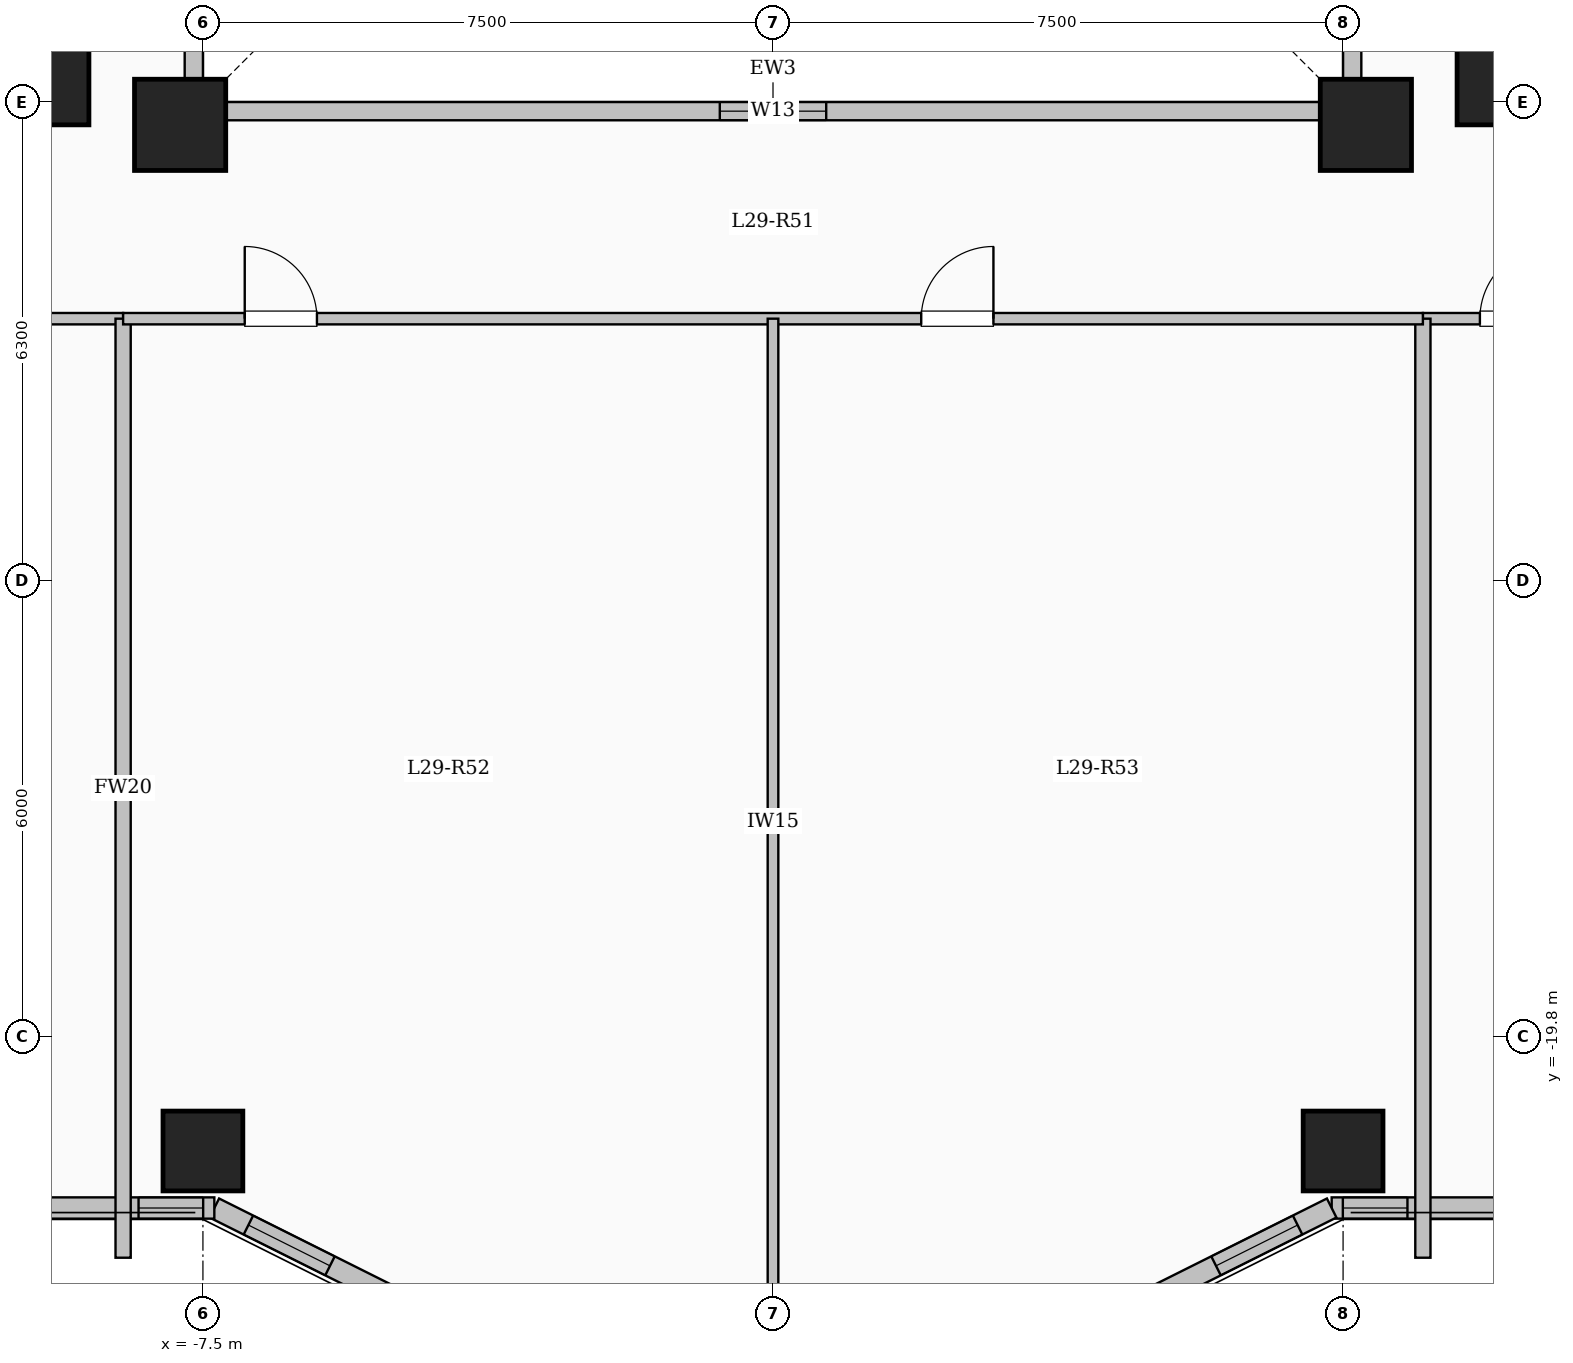
"""IFC4 building model, lengths in metres.
Left out: names, types, materials, properties, quantities, classifications, styles, units other than length and angle.
Written with IfcOpenShell. Run it as: python <this file> out.ifc"""

import sys

from ifc_helpers import new_model, si_unit, direction, frame, frame_2d, origin, origin_2d, place, context, subcontext, project, spatial, rectangle, extrude, element, fill, save


model = new_model("IFC4")
c1 = context("Model", 3, precision=1e-05, world=origin(), true_north=direction((0.0, 1.0)))
c2 = subcontext(c1, "Body", "Model", "MODEL_VIEW")
j1 = project(units=[si_unit("LENGTHUNIT", "METRE"), si_unit("PLANEANGLEUNIT", "RADIAN")], contexts=[c1])
p1 = place(None, origin())
s1 = spatial("IfcSite", under=j1, at=p1, CompositionType="ELEMENT")
p2 = place(p1, origin())
s2 = spatial("IfcBuilding", under=s1, at=p2, CompositionType="ELEMENT")
p3 = place(p2, frame((0.0, 0.0, 108.45)))
s3 = spatial("IfcBuildingStorey", under=s2, at=p3, CompositionType="ELEMENT", Elevation=108.45)
for number, where, z_axis, x_axis in (
    (1, (-7.8, -7.8, 0.0), (0.0, 0.0, 1.0), (1.0, 0.0, 0.0)),
    (2, (7.8, -7.8, 0.0), (0.0, 0.0, 1.0), (1.0, 0.0, 0.0)),
    (3, (-9.6, -7.2, 0.0), (0.0, 0.0, 1.0), (1.0, 0.0, 0.0)),
    (4, (9.6, -7.2, 0.0), (0.0, 0.0, 1.0), (1.0, 0.0, 0.0)),
):
    element("IfcColumn", number, at=place(p3, frame(where, z_axis=z_axis, x_axis=x_axis)), inside=s3, PredefinedType="COLUMN", context=c2, shape_type="SweptSolid", body=[
        extrude(rectangle(XDim=1.2, YDim=1.2, at=origin_2d()), origin(), (0.0, 0.0, 1.0), 3.35),
    ])
for number, where, z_axis, x_axis in (
    (5, (-7.5, -21.3, 0.0), (0.0, 0.0, 1.0), (1.0, 0.0, 0.0)),
    (6, (7.5, -21.3, 0.0), (0.0, 0.0, 1.0), (1.0, 0.0, 0.0)),
):
    element("IfcColumn", number, at=place(p3, frame(where, z_axis=z_axis, x_axis=x_axis)), inside=s3, PredefinedType="COLUMN", context=c2, shape_type="SweptSolid", body=[
        extrude(rectangle(XDim=1.05, YDim=1.05, at=origin_2d()), origin(), (0.0, 0.0, 1.0), 3.35),
    ])
p4 = place(p3, frame((-7.62, -7.62, 0.0), z_axis=(0.0, 0.0, 1.0), x_axis=(1.0, 0.0, 0.0)))
e7 = element("IfcWall", 7, at=p4, inside=s3, PredefinedType="SOLIDWALL", context=c2, shape_type="SweptSolid", body=[
    extrude(rectangle(XDim=15.24, YDim=0.24, at=frame_2d((7.62, 0.0))), origin(), (0.0, 0.0, 1.0), 3.1),
])
p5 = place(p4, frame((6.92, 0.0, 0.95)))
e8 = element("IfcOpeningElement", 8, at=p5, cuts=e7, PredefinedType="OPENING", context=c2, shape_type="SweptSolid", body=[
    extrude(rectangle(XDim=1.4, YDim=1.5, at=frame_2d((0.7, 0.75))), frame((0.0, 0.13, 0.0), z_axis=(0.0, -1.0, 0.0), x_axis=(1.0, 0.0, 0.0)), (0.0, 0.0, 1.0), 0.26),
])
p6 = place(p3, frame((7.62, -7.62, 0.0), z_axis=(0.0, 0.0, 1.0), x_axis=(0.0, 1.0, 0.0)))
e9 = element("IfcWall", 9, at=p6, inside=s3, PredefinedType="SOLIDWALL", context=c2, shape_type="SweptSolid", body=[
    extrude(rectangle(XDim=15.24, YDim=0.24, at=frame_2d((7.62, 0.0))), origin(), (0.0, 0.0, 1.0), 3.1),
])
p7 = place(p6, frame((6.92, 0.0, 0.95)))
e10 = element("IfcOpeningElement", 10, at=p7, cuts=e9, PredefinedType="OPENING", context=c2, shape_type="SweptSolid", body=[
    extrude(rectangle(XDim=1.4, YDim=1.5, at=frame_2d((0.7, 0.75))), frame((0.0, 0.13, 0.0), z_axis=(0.0, -1.0, 0.0), x_axis=(1.0, 0.0, 0.0)), (0.0, 0.0, 1.0), 0.26),
])
p8 = place(p3, frame((-7.62, 7.62, 0.0), z_axis=(0.0, 0.0, 1.0), x_axis=(0.0, -1.0, 0.0)))
e11 = element("IfcWall", 11, at=p8, inside=s3, PredefinedType="SOLIDWALL", context=c2, shape_type="SweptSolid", body=[
    extrude(rectangle(XDim=15.24, YDim=0.24, at=frame_2d((7.62, 0.0))), origin(), (0.0, 0.0, 1.0), 3.1),
])
p9 = place(p8, frame((6.92, 0.0, 0.95)))
e12 = element("IfcOpeningElement", 12, at=p9, cuts=e11, PredefinedType="OPENING", context=c2, shape_type="SweptSolid", body=[
    extrude(rectangle(XDim=1.4, YDim=1.5, at=frame_2d((0.7, 0.75))), frame((0.0, 0.13, 0.0), z_axis=(0.0, -1.0, 0.0), x_axis=(1.0, 0.0, 0.0)), (0.0, 0.0, 1.0), 0.26),
])
p10 = place(p3, frame((21.15, -22.05, 0.0), z_axis=(0.0, 0.0, 1.0), x_axis=(-1.0, 0.0, 0.0)))
e13 = element("IfcWall", 13, at=p10, inside=s3, PredefinedType="SOLIDWALL", context=c2, shape_type="SweptSolid", body=[
    extrude(rectangle(XDim=13.8, YDim=0.28, at=frame_2d((6.9, 0.0))), origin(), (0.0, 0.0, 1.0), 3.1),
])
p11 = place(p10, frame((0.88, 0.0, 0.95)))
e14 = element("IfcOpeningElement", 14, at=p11, cuts=e13, PredefinedType="OPENING", context=c2, shape_type="SweptSolid", body=[
    extrude(rectangle(XDim=1.2, YDim=1.5, at=frame_2d((0.6, 0.75))), frame((0.0, 0.15, 0.0), z_axis=(0.0, -1.0, 0.0), x_axis=(1.0, 0.0, 0.0)), (0.0, 0.0, 1.0), 0.3),
])
p12 = place(p10, frame((3.64, 0.0, 0.95)))
e15 = element("IfcOpeningElement", 15, at=p12, cuts=e13, PredefinedType="OPENING", context=c2, shape_type="SweptSolid", body=[
    extrude(rectangle(XDim=1.2, YDim=1.5, at=frame_2d((0.6, 0.75))), frame((0.0, 0.15, 0.0), z_axis=(0.0, -1.0, 0.0), x_axis=(1.0, 0.0, 0.0)), (0.0, 0.0, 1.0), 0.3),
])
p13 = place(p10, frame((6.35, 0.0, 0.95)))
e16 = element("IfcOpeningElement", 16, at=p13, cuts=e13, PredefinedType="OPENING", context=c2, shape_type="SweptSolid", body=[
    extrude(rectangle(XDim=1.2, YDim=1.5, at=frame_2d((0.6, 0.75))), frame((0.0, 0.15, 0.0), z_axis=(0.0, -1.0, 0.0), x_axis=(1.0, 0.0, 0.0)), (0.0, 0.0, 1.0), 0.3),
])
p14 = place(p10, frame((9.238, 0.0, 0.9)))
e17 = element("IfcOpeningElement", 17, at=p14, cuts=e13, PredefinedType="OPENING", context=c2, shape_type="SweptSolid", body=[
    extrude(rectangle(XDim=2.4, YDim=1.8, at=frame_2d((1.2, 0.9))), frame((0.0, 0.15, 0.0), z_axis=(0.0, -1.0, 0.0), x_axis=(1.0, 0.0, 0.0)), (0.0, 0.0, 1.0), 0.3),
])
p15 = place(p10, frame((12.803, 0.0, 0.95)))
e18 = element("IfcOpeningElement", 18, at=p15, cuts=e13, PredefinedType="OPENING", context=c2, shape_type="SweptSolid", body=[
    extrude(rectangle(XDim=0.85, YDim=1.5, at=frame_2d((0.425, 0.75))), frame((0.0, 0.15, 0.0), z_axis=(0.0, -1.0, 0.0), x_axis=(1.0, 0.0, 0.0)), (0.0, 0.0, 1.0), 0.3),
])
p16 = place(p3, frame((7.35, -22.05, 0.0), z_axis=(0.0, 0.0, 1.0), x_axis=(-0.894427191, -0.4472135955, 0.0)))
e19 = element("IfcWall", 19, at=p16, inside=s3, PredefinedType="SOLIDWALL", context=c2, shape_type="SweptSolid", body=[
    extrude(rectangle(XDim=3.354, YDim=0.28, at=frame_2d((1.677, 0.0))), origin(), (0.0, 0.0, 1.0), 3.1),
])
p17 = place(p16, frame((0.501, 0.0, 0.95)))
e20 = element("IfcOpeningElement", 20, at=p17, cuts=e19, PredefinedType="OPENING", context=c2, shape_type="SweptSolid", body=[
    extrude(rectangle(XDim=1.2, YDim=1.5, at=frame_2d((0.6, 0.75))), frame((0.0, 0.15, 0.0), z_axis=(0.0, -1.0, 0.0), x_axis=(1.0, 0.0, 0.0)), (0.0, 0.0, 1.0), 0.3),
])
p18 = place(p3, frame((-4.35, -23.55, 0.0), z_axis=(0.0, 0.0, 1.0), x_axis=(-0.894427191, 0.4472135955, 0.0)))
e21 = element("IfcWall", 21, at=p18, inside=s3, PredefinedType="SOLIDWALL", context=c2, shape_type="SweptSolid", body=[
    extrude(rectangle(XDim=3.354, YDim=0.28, at=frame_2d((1.677, 0.0))), origin(), (0.0, 0.0, 1.0), 3.1),
])
p19 = place(p18, frame((1.653, 0.0, 0.95)))
e22 = element("IfcOpeningElement", 22, at=p19, cuts=e21, PredefinedType="OPENING", context=c2, shape_type="SweptSolid", body=[
    extrude(rectangle(XDim=1.2, YDim=1.5, at=frame_2d((0.6, 0.75))), frame((0.0, 0.15, 0.0), z_axis=(0.0, -1.0, 0.0), x_axis=(1.0, 0.0, 0.0)), (0.0, 0.0, 1.0), 0.3),
])
p20 = place(p3, frame((-7.35, -22.05, 0.0), z_axis=(0.0, 0.0, 1.0), x_axis=(-1.0, 0.0, 0.0)))
e23 = element("IfcWall", 23, at=p20, inside=s3, PredefinedType="SOLIDWALL", context=c2, shape_type="SweptSolid", body=[
    extrude(rectangle(XDim=13.8, YDim=0.28, at=frame_2d((6.9, 0.0))), origin(), (0.0, 0.0, 1.0), 3.1),
])
p21 = place(p20, frame((0.147, 0.0, 0.95)))
e24 = element("IfcOpeningElement", 24, at=p21, cuts=e23, PredefinedType="OPENING", context=c2, shape_type="SweptSolid", body=[
    extrude(rectangle(XDim=0.85, YDim=1.5, at=frame_2d((0.425, 0.75))), frame((0.0, 0.15, 0.0), z_axis=(0.0, -1.0, 0.0), x_axis=(1.0, 0.0, 0.0)), (0.0, 0.0, 1.0), 0.3),
])
p22 = place(p20, frame((6.075, 0.0, 0.9)))
e25 = element("IfcOpeningElement", 25, at=p22, cuts=e23, PredefinedType="OPENING", context=c2, shape_type="SweptSolid", body=[
    extrude(rectangle(XDim=1.8, YDim=1.65, at=frame_2d((0.9, 0.825))), frame((0.0, 0.15, 0.0), z_axis=(0.0, -1.0, 0.0), x_axis=(1.0, 0.0, 0.0)), (0.0, 0.0, 1.0), 0.3),
])
p23 = place(p20, frame((10.492, 0.0, 0.9)))
e26 = element("IfcOpeningElement", 26, at=p23, cuts=e23, PredefinedType="OPENING", context=c2, shape_type="SweptSolid", body=[
    extrude(rectangle(XDim=2.0, YDim=1.7, at=frame_2d((1.0, 0.85))), frame((0.0, 0.15, 0.0), z_axis=(0.0, -1.0, 0.0), x_axis=(1.0, 0.0, 0.0)), (0.0, 0.0, 1.0), 0.3),
])
p24 = place(p3, frame((-21.05, -10.35, 0.0), z_axis=(0.0, 0.0, 1.0), x_axis=(1.0, 0.0, 0.0)))
e27 = element("IfcWall", 27, at=p24, inside=s3, PredefinedType="PARTITIONING", context=c2, shape_type="SweptSolid", body=[
    extrude(rectangle(XDim=12.5, YDim=0.15, at=frame_2d((6.25, 0.0))), origin(), (0.0, 0.0, 1.0), 3.1),
])
p25 = place(p24, frame((1.736, 0.0, 0.0)))
e28 = element("IfcOpeningElement", 28, at=p25, cuts=e27, PredefinedType="OPENING", context=c2, shape_type="SweptSolid", body=[
    extrude(rectangle(XDim=0.95, YDim=2.15, at=frame_2d((0.475, 1.075))), frame((0.0, 0.085, 0.0), z_axis=(0.0, -1.0, 0.0), x_axis=(1.0, 0.0, 0.0)), (0.0, 0.0, 1.0), 0.17),
])
p26 = place(p24, frame((6.248, 0.0, 0.0)))
e29 = element("IfcOpeningElement", 29, at=p26, cuts=e27, PredefinedType="OPENING", context=c2, shape_type="SweptSolid", body=[
    extrude(rectangle(XDim=0.95, YDim=2.15, at=frame_2d((0.475, 1.075))), frame((0.0, 0.085, 0.0), z_axis=(0.0, -1.0, 0.0), x_axis=(1.0, 0.0, 0.0)), (0.0, 0.0, 1.0), 0.17),
])
p27 = place(p24, frame((10.262, 0.0, 0.0)))
e30 = element("IfcOpeningElement", 30, at=p27, cuts=e27, PredefinedType="OPENING", context=c2, shape_type="SweptSolid", body=[
    extrude(rectangle(XDim=0.95, YDim=2.15, at=frame_2d((0.475, 1.075))), frame((0.0, 0.085, 0.0), z_axis=(0.0, -1.0, 0.0), x_axis=(1.0, 0.0, 0.0)), (0.0, 0.0, 1.0), 0.17),
])
p28 = place(p3, frame((8.55, -10.35, 0.0), z_axis=(0.0, 0.0, 1.0), x_axis=(1.0, 0.0, 0.0)))
e31 = element("IfcWall", 31, at=p28, inside=s3, PredefinedType="PARTITIONING", context=c2, shape_type="SweptSolid", body=[
    extrude(rectangle(XDim=12.5, YDim=0.15, at=frame_2d((6.25, 0.0))), origin(), (0.0, 0.0, 1.0), 3.1),
])
p29 = place(p28, frame((0.75, 0.0, 0.0)))
e32 = element("IfcOpeningElement", 32, at=p29, cuts=e31, PredefinedType="OPENING", context=c2, shape_type="SweptSolid", body=[
    extrude(rectangle(XDim=0.96, YDim=2.15, at=frame_2d((0.48, 1.075))), frame((0.0, 0.085, 0.0), z_axis=(0.0, -1.0, 0.0), x_axis=(1.0, 0.0, 0.0)), (0.0, 0.0, 1.0), 0.17),
])
for number, where, z_axis, x_axis in (
    (33, (-8.55, -22.704, 0.0), (0.0, 0.0, 1.0), (0.0, 1.0, 0.0)),
    (34, (8.55, -22.704, 0.0), (0.0, 0.0, 1.0), (0.0, 1.0, 0.0)),
):
    element("IfcWall", number, at=place(p3, frame(where, z_axis=z_axis, x_axis=x_axis)), inside=s3, PredefinedType="SOLIDWALL", context=c2, shape_type="SweptSolid", body=[
        extrude(rectangle(XDim=12.354, YDim=0.2, at=frame_2d((6.177, 0.0))), origin(), (0.0, 0.0, 1.0), 3.1),
    ])
p30 = place(p3, frame((-8.55, -10.35, 0.0), z_axis=(0.0, 0.0, 1.0), x_axis=(1.0, 0.0, 0.0)))
e35 = element("IfcWall", 35, at=p30, inside=s3, PredefinedType="PARTITIONING", context=c2, shape_type="SweptSolid", body=[
    extrude(rectangle(XDim=17.1, YDim=0.15, at=frame_2d((8.55, 0.0))), origin(), (0.0, 0.0, 1.0), 3.1),
])
p31 = place(p30, frame((1.6, 0.0, 0.0)))
e36 = element("IfcOpeningElement", 36, at=p31, cuts=e35, PredefinedType="OPENING", context=c2, shape_type="SweptSolid", body=[
    extrude(rectangle(XDim=0.95, YDim=2.15, at=frame_2d((0.475, 1.075))), frame((0.0, 0.085, 0.0), z_axis=(0.0, -1.0, 0.0), x_axis=(1.0, 0.0, 0.0)), (0.0, 0.0, 1.0), 0.17),
])
p32 = place(p30, frame((10.5, 0.0, 0.0)))
e37 = element("IfcOpeningElement", 37, at=p32, cuts=e35, PredefinedType="OPENING", context=c2, shape_type="SweptSolid", body=[
    extrude(rectangle(XDim=0.95, YDim=2.15, at=frame_2d((0.475, 1.075))), frame((0.0, 0.085, 0.0), z_axis=(0.0, -1.0, 0.0), x_axis=(1.0, 0.0, 0.0)), (0.0, 0.0, 1.0), 0.17),
])
p33 = place(p3, frame((0.0, -23.58, 0.0), z_axis=(0.0, 0.0, 1.0), x_axis=(0.0, 1.0, 0.0)))
e38 = element("IfcWall", 38, at=p33, inside=s3, PredefinedType="PARTITIONING", context=c2, shape_type="SweptSolid", body=[
    extrude(rectangle(XDim=13.23, YDim=0.14, at=frame_2d((6.615, 0.0))), origin(), (0.0, 0.0, 1.0), 3.1),
])
p34 = place(p5, origin())
e39 = element("IfcWindow", 39, at=p34, inside=s3, PartitioningType="SINGLE_PANEL", PredefinedType="WINDOW", context=c2, shape_type="SweptSolid", body=[
    extrude(rectangle(XDim=1.4, YDim=1.5, at=frame_2d((0.7, 0.75))), frame((0.0, 0.03, 0.0), z_axis=(0.0, -1.0, 0.0), x_axis=(1.0, 0.0, 0.0)), (0.0, 0.0, 1.0), 0.06),
])
fill(e8, e39)
p35 = place(p15, origin())
e40 = element("IfcWindow", 40, at=p35, inside=s3, PartitioningType="SINGLE_PANEL", PredefinedType="WINDOW", context=c2, shape_type="SweptSolid", body=[
    extrude(rectangle(XDim=0.85, YDim=1.5, at=frame_2d((0.425, 0.75))), frame((0.0, 0.03, 0.0), z_axis=(0.0, -1.0, 0.0), x_axis=(1.0, 0.0, 0.0)), (0.0, 0.0, 1.0), 0.06),
])
fill(e18, e40)
p36 = place(p17, origin())
e41 = element("IfcWindow", 41, at=p36, inside=s3, PartitioningType="SINGLE_PANEL", PredefinedType="WINDOW", context=c2, shape_type="SweptSolid", body=[
    extrude(rectangle(XDim=1.2, YDim=1.5, at=frame_2d((0.6, 0.75))), frame((0.0, 0.03, 0.0), z_axis=(0.0, -1.0, 0.0), x_axis=(1.0, 0.0, 0.0)), (0.0, 0.0, 1.0), 0.06),
])
fill(e20, e41)
p37 = place(p19, origin())
e42 = element("IfcWindow", 42, at=p37, inside=s3, PartitioningType="SINGLE_PANEL", PredefinedType="WINDOW", context=c2, shape_type="SweptSolid", body=[
    extrude(rectangle(XDim=1.2, YDim=1.5, at=frame_2d((0.6, 0.75))), frame((0.0, 0.03, 0.0), z_axis=(0.0, -1.0, 0.0), x_axis=(1.0, 0.0, 0.0)), (0.0, 0.0, 1.0), 0.06),
])
fill(e22, e42)
p38 = place(p21, origin())
e43 = element("IfcWindow", 43, at=p38, inside=s3, PartitioningType="SINGLE_PANEL", PredefinedType="WINDOW", context=c2, shape_type="SweptSolid", body=[
    extrude(rectangle(XDim=0.85, YDim=1.5, at=frame_2d((0.425, 0.75))), frame((0.0, 0.03, 0.0), z_axis=(0.0, -1.0, 0.0), x_axis=(1.0, 0.0, 0.0)), (0.0, 0.0, 1.0), 0.06),
])
fill(e24, e43)
p39 = place(p29, origin())
e44 = element("IfcDoor", 44, at=p39, inside=s3, OperationType="SINGLE_SWING_RIGHT", PredefinedType="DOOR", context=c2, shape_type="SweptSolid", body=[
    extrude(rectangle(XDim=0.96, YDim=2.15, at=frame_2d((0.48, 1.075))), frame((0.0, 0.025, 0.0), z_axis=(0.0, -1.0, 0.0), x_axis=(1.0, 0.0, 0.0)), (0.0, 0.0, 1.0), 0.05),
])
fill(e32, e44)
p40 = place(p31, origin())
e45 = element("IfcDoor", 45, at=p40, inside=s3, OperationType="SINGLE_SWING_LEFT", PredefinedType="DOOR", context=c2, shape_type="SweptSolid", body=[
    extrude(rectangle(XDim=0.95, YDim=2.15, at=frame_2d((0.475, 1.075))), frame((0.0, 0.025, 0.0), z_axis=(0.0, -1.0, 0.0), x_axis=(1.0, 0.0, 0.0)), (0.0, 0.0, 1.0), 0.05),
])
fill(e36, e45)
p41 = place(p32, origin())
e46 = element("IfcDoor", 46, at=p41, inside=s3, OperationType="SINGLE_SWING_RIGHT", PredefinedType="DOOR", context=c2, shape_type="SweptSolid", body=[
    extrude(rectangle(XDim=0.95, YDim=2.15, at=frame_2d((0.475, 1.075))), frame((0.0, 0.025, 0.0), z_axis=(0.0, -1.0, 0.0), x_axis=(1.0, 0.0, 0.0)), (0.0, 0.0, 1.0), 0.05),
])
fill(e37, e46)
save(model, sys.argv[1])
